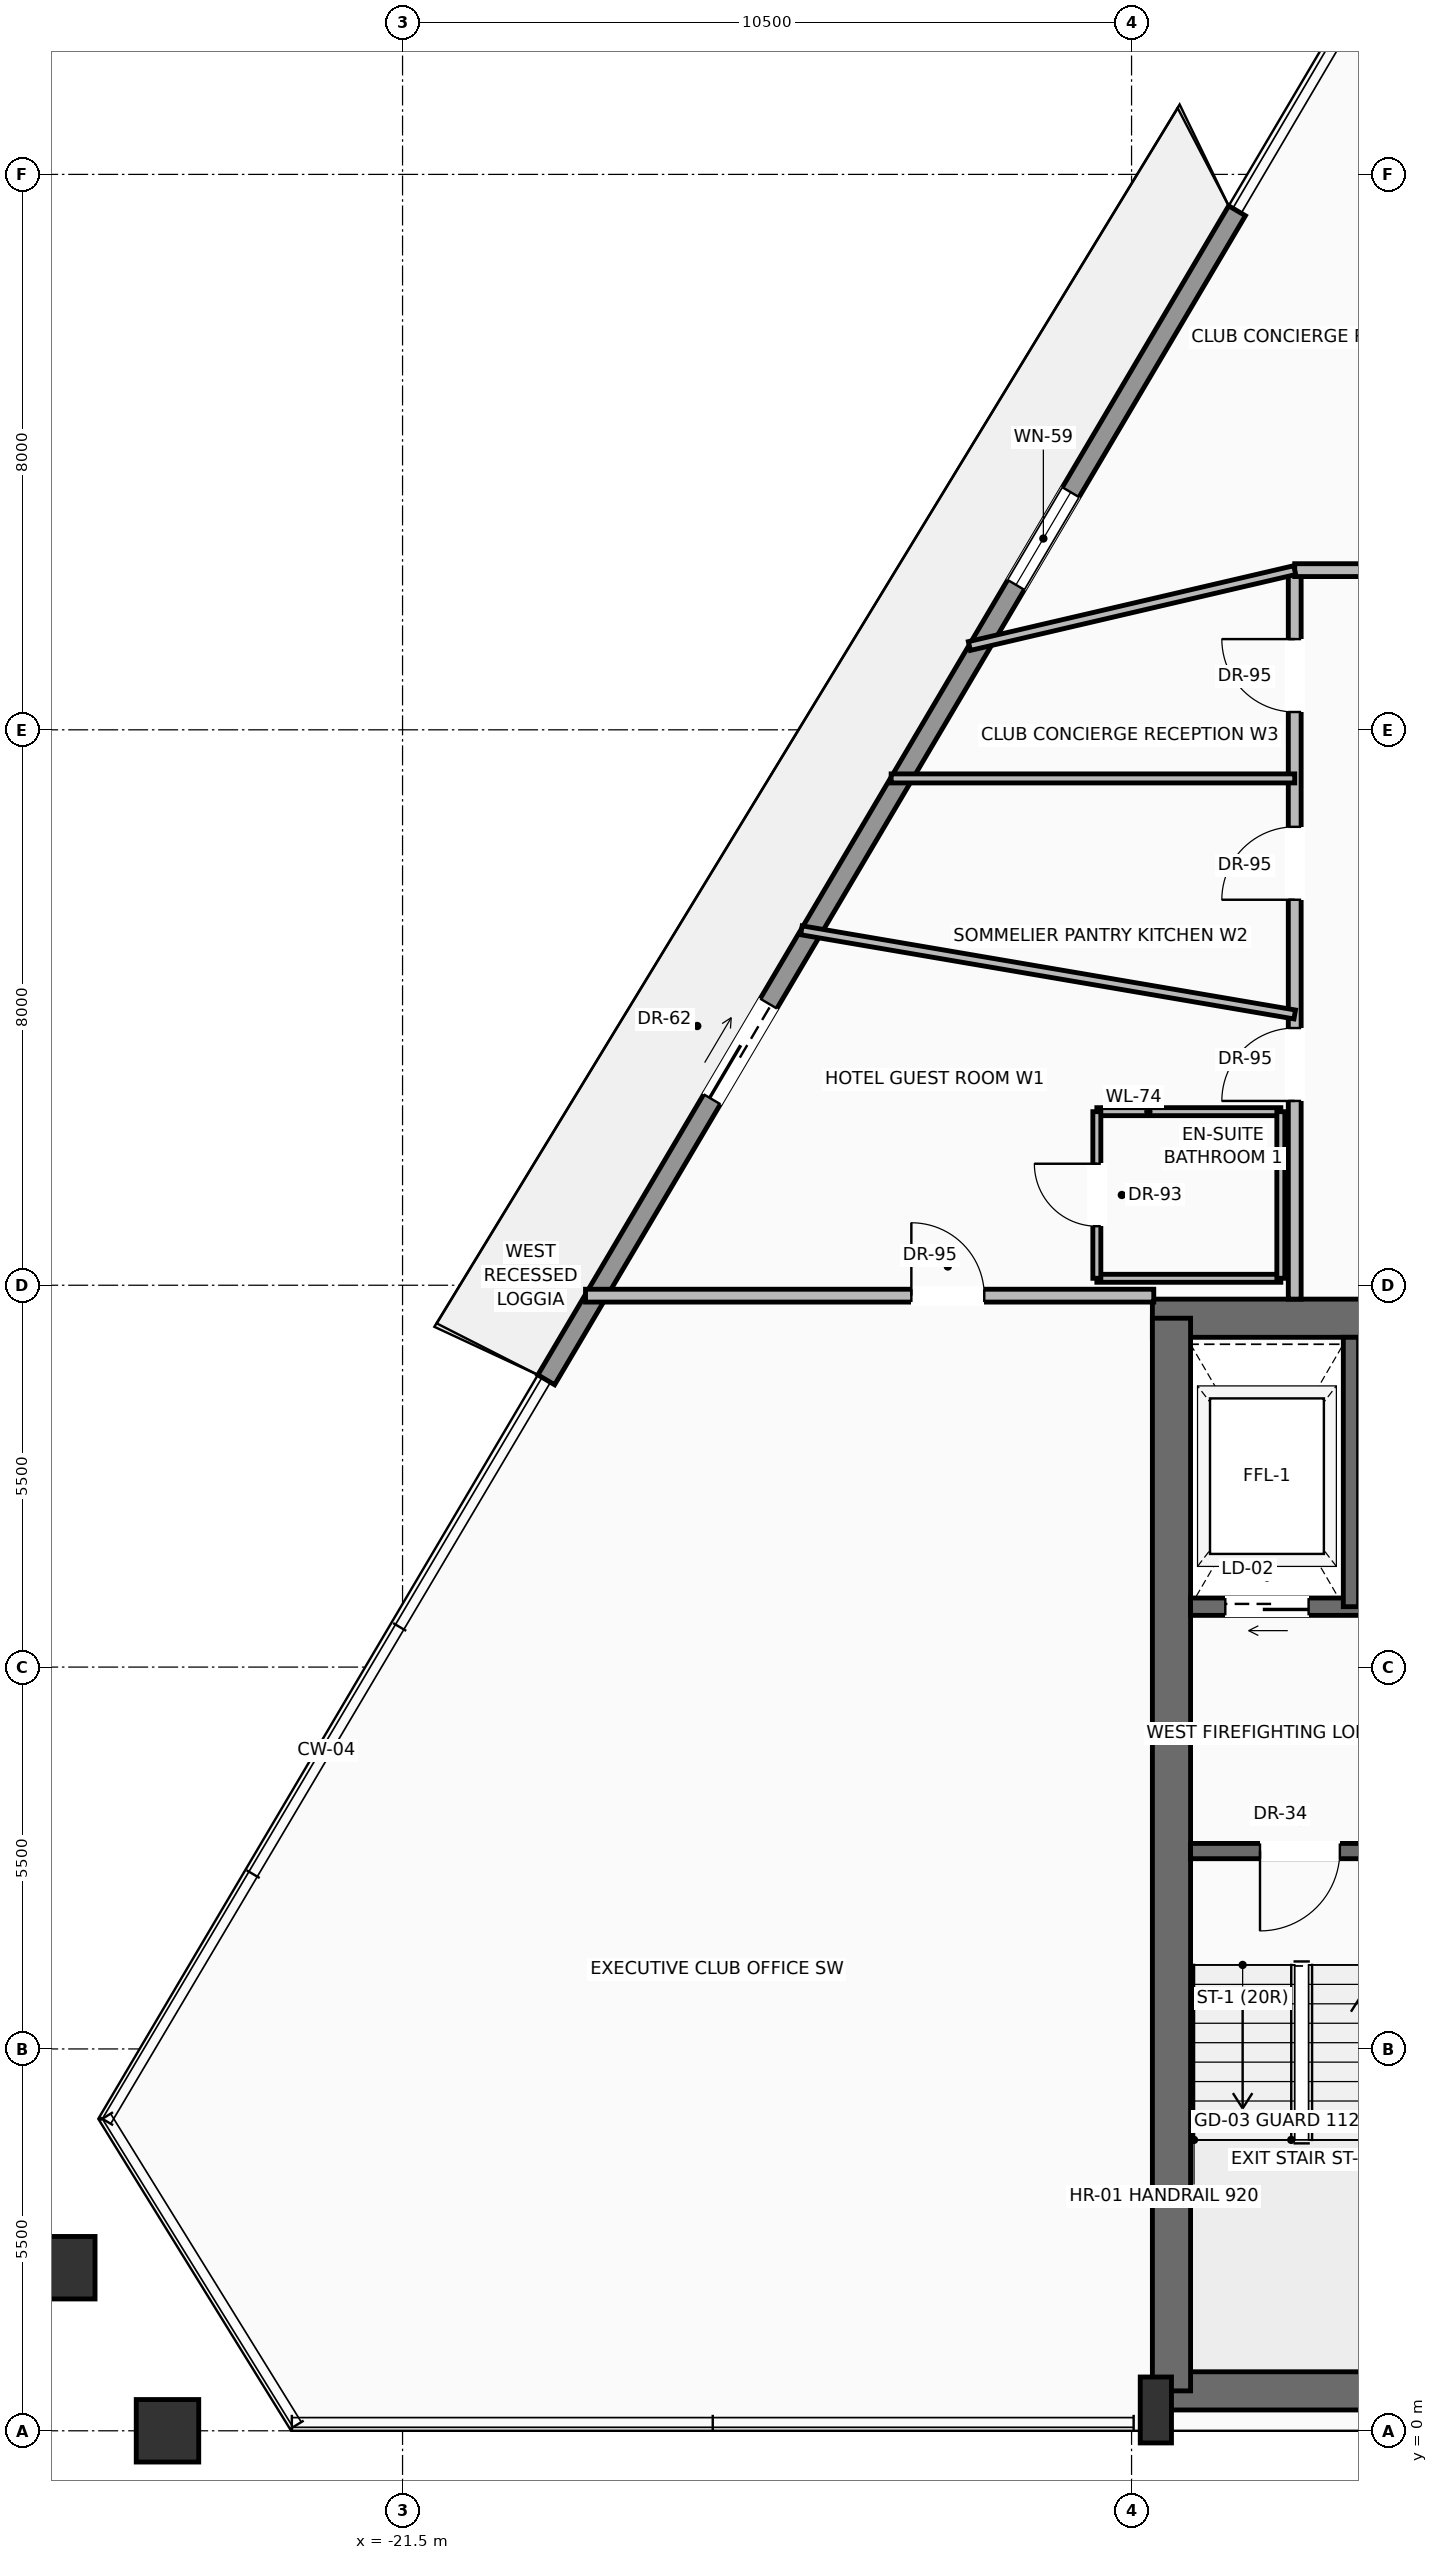
"""IFC4 building model, lengths in metres.
Left out: names, types, materials, properties, quantities, classifications, styles, units other than length and angle.
Written with IfcOpenShell. Run it as: python <this file> out.ifc"""

import sys

from ifc_helpers import new_model, si_unit, direction, frame, frame_2d, origin, origin_2d, place, context, subcontext, project, spatial, rectangle, hollow_rectangle, extrude, source, transform, mapped, element, fill, save


model = new_model("IFC4")
c1 = context("Model", 3, precision=1e-05, world=origin(), true_north=direction((0.0, 1.0)))
c2 = subcontext(c1, "Body", "Model", "MODEL_VIEW")
j1 = project(units=[si_unit("LENGTHUNIT", "METRE"), si_unit("PLANEANGLEUNIT", "RADIAN")], contexts=[c1])
p1 = place(None, origin())
s1 = spatial("IfcSite", under=j1, at=p1, CompositionType="ELEMENT")
p2 = place(p1, origin())
s2 = spatial("IfcBuilding", under=s1, at=p2, CompositionType="ELEMENT")
p3 = place(p2, frame((0.0, 0.0, 237.25)))
s3 = spatial("IfcBuildingStorey", under=s2, at=p3, CompositionType="ELEMENT", Elevation=237.25)
p4 = place(p3, frame((-10.65, 0.575, 0.0), z_axis=(0.0, 0.0, 1.0), x_axis=(1.0, 0.0, 0.0)))
e1 = element("IfcWall", 1, at=p4, inside=s3, PredefinedType="SHEAR", context=c2, shape_type="SweptSolid", body=[
    extrude(rectangle(XDim=21.3, YDim=0.55, at=frame_2d((10.65, 0.0))), origin(), (0.0, 0.0, 1.0), 3.24),
])
p5 = place(p3, frame((-10.7, 16.025, 0.0), z_axis=(0.0, 0.0, 1.0), x_axis=(1.0, 0.0, 0.0)))
e2 = element("IfcWall", 2, at=p5, inside=s3, PredefinedType="SHEAR", context=c2, shape_type="SweptSolid", body=[
    extrude(rectangle(XDim=21.4, YDim=0.55, at=frame_2d((10.7, 0.0))), origin(), (0.0, 0.0, 1.0), 3.24),
])
p6 = place(p5, frame((3.27, 0.0, 0.0)))
e3 = element("IfcOpeningElement", 3, at=p6, cuts=e2, PredefinedType="OPENING", context=c2, shape_type="SweptSolid", body=[
    extrude(rectangle(XDim=1.3, YDim=2.3, at=frame_2d((0.65, 1.15))), frame((0.0, 0.285, 0.0), z_axis=(0.0, -1.0, 0.0), x_axis=(1.0, 0.0, 0.0)), (0.0, 0.0, 1.0), 0.57),
])
p7 = place(p5, frame((9.7, 0.0, 0.0)))
e4 = element("IfcOpeningElement", 4, at=p7, cuts=e2, PredefinedType="OPENING", context=c2, shape_type="SweptSolid", body=[
    extrude(rectangle(XDim=2.0, YDim=2.4, at=frame_2d((1.0, 1.2))), frame((0.0, 0.285, 0.0), z_axis=(0.0, -1.0, 0.0), x_axis=(1.0, 0.0, 0.0)), (0.0, 0.0, 1.0), 0.57),
])
p8 = place(p3, frame((-10.425, 0.575, 0.0), z_axis=(0.0, 0.0, 1.0), x_axis=(0.0, 1.0, 0.0)))
e5 = element("IfcWall", 5, at=p8, inside=s3, PredefinedType="SHEAR", context=c2, shape_type="SweptSolid", body=[
    extrude(rectangle(XDim=15.45, YDim=0.55, at=frame_2d((7.725, 0.0))), origin(), (0.0, 0.0, 1.0), 3.24),
])
m1 = source(origin(), c2, "Body", "SweptSolid", [
    extrude(rectangle(XDim=0.45, YDim=0.95, at=origin_2d()), origin(), (0.0, 0.0, 1.0), 3.45),
])
p9 = place(p3, frame((-10.65, 0.3, 0.0), z_axis=(0.0, 0.0, 1.0), x_axis=(1.0, 0.0, 0.0)))
e6 = element("IfcColumn", 6, at=p9, inside=s3, PredefinedType="PILASTER", context=c2, shape_type="MappedRepresentation", body=[
    mapped(m1, transform((0.0, 0.0, 0.0), scale=1.0)),
])
m2 = source(origin(), c2, "Body", "SweptSolid", [
    extrude(hollow_rectangle(XDim=0.9, YDim=0.9, WallThickness=0.045, at=origin_2d()), origin(), (0.0, 0.0, 1.0), 3.441),
])
p10 = place(p3, frame((-24.885, 0.0, 0.004), z_axis=(-0.003192605226, 0.0, 0.999994903623), x_axis=(0.0, -1.0, 0.0)))
e7 = element("IfcColumn", 7, at=p10, inside=s3, PredefinedType="COLUMN", context=c2, shape_type="MappedRepresentation", body=[
    mapped(m2, transform((0.0, 0.0, 0.0), scale=1.0)),
])
m3 = source(origin(), c2, "Body", "SweptSolid", [
    extrude(hollow_rectangle(XDim=0.9, YDim=0.9, WallThickness=0.045, at=origin_2d()), origin(), (0.0, 0.0, 1.0), 3.442),
])
p11 = place(p3, frame((-26.379, 2.349, 0.004), z_axis=(0.00893764405, -0.017307818636, 0.999810260966), x_axis=(0.888524887604, 0.458828425566, 0.0)))
e8 = element("IfcColumn", 8, at=p11, inside=s3, PredefinedType="COLUMN", context=c2, shape_type="MappedRepresentation", body=[
    mapped(m3, transform((0.0, 0.0, 0.0), scale=1.0)),
])
p12 = place(p3, frame((-19.43, 15.137, 0.0), z_axis=(0.0, 0.0, 1.0), x_axis=(0.508699873742, 0.860943922944, 0.0)))
e9 = element("IfcWall", 9, at=p12, inside=s3, PredefinedType="SOLIDWALL", context=c2, shape_type="SweptSolid", body=[
    extrude(rectangle(XDim=19.559, YDim=0.28, at=frame_2d((9.779, 0.0))), origin(), (0.0, 0.0, 1.0), 2.82),
])
p13 = place(p12, frame((4.694, 0.0, 0.0)))
e10 = element("IfcOpeningElement", 10, at=p13, cuts=e9, PredefinedType="OPENING", context=c2, shape_type="SweptSolid", body=[
    extrude(rectangle(XDim=1.6, YDim=2.35, at=frame_2d((0.8, 1.175))), frame((0.0, 0.15, 0.0), z_axis=(0.0, -1.0, 0.0), x_axis=(1.0, 0.0, 0.0)), (0.0, 0.0, 1.0), 0.3),
])
p14 = place(p12, frame((13.3, 0.0, 0.9)))
e11 = element("IfcOpeningElement", 11, at=p14, cuts=e9, PredefinedType="OPENING", context=c2, shape_type="SweptSolid", body=[
    extrude(rectangle(XDim=1.55, YDim=1.75, at=frame_2d((0.775, 0.875))), frame((0.0, 0.15, 0.0), z_axis=(0.0, -1.0, 0.0), x_axis=(1.0, 0.0, 0.0)), (0.0, 0.0, 1.0), 0.3),
])
p15 = place(p3, frame((-5.5, 8.35, 0.0), z_axis=(0.0, 0.0, 1.0), x_axis=(-1.0, 0.0, 0.0)))
e12 = element("IfcWall", 12, at=p15, inside=s3, PredefinedType="SOLIDWALL", context=c2, shape_type="SweptSolid", body=[
    extrude(rectangle(XDim=4.65, YDim=0.22, at=frame_2d((2.325, 0.0))), origin(), (0.0, 0.0, 1.0), 3.24),
])
p16 = place(p15, frame((2.5, 0.0, 0.0)))
e13 = element("IfcOpeningElement", 13, at=p16, cuts=e12, PredefinedType="OPENING", context=c2, shape_type="SweptSolid", body=[
    extrude(rectangle(XDim=1.15, YDim=2.2, at=frame_2d((0.575, 1.1))), frame((0.0, 0.12, 0.0), z_axis=(0.0, -1.0, 0.0), x_axis=(1.0, 0.0, 0.0)), (0.0, 0.0, 1.0), 0.24),
])
p17 = place(p3, frame((-5.5, 11.87, 0.0), z_axis=(0.0, 0.0, 1.0), x_axis=(-1.0, 0.0, 0.0)))
e14 = element("IfcWall", 14, at=p17, inside=s3, PredefinedType="SOLIDWALL", context=c2, shape_type="SweptSolid", body=[
    extrude(rectangle(XDim=4.65, YDim=0.25, at=frame_2d((2.325, 0.0))), origin(), (0.0, 0.0, 1.0), 3.24),
])
p18 = place(p17, frame((2.95, 0.0, 0.0)))
e15 = element("IfcOpeningElement", 15, at=p18, cuts=e14, PredefinedType="OPENING", context=c2, shape_type="SweptSolid", body=[
    extrude(rectangle(XDim=1.2, YDim=2.25, at=frame_2d((0.6, 1.125))), frame((0.0, 0.135, 0.0), z_axis=(0.0, -1.0, 0.0), x_axis=(1.0, 0.0, 0.0)), (0.0, 0.0, 1.0), 0.27),
])
p19 = place(p3, frame((-7.84, 11.87, 0.0), z_axis=(0.0, 0.0, 1.0), x_axis=(0.0, 1.0, 0.0)))
e16 = element("IfcWall", 16, at=p19, inside=s3, PredefinedType="SOLIDWALL", context=c2, shape_type="SweptSolid", body=[
    extrude(rectangle(XDim=3.88, YDim=0.22, at=frame_2d((1.94, 0.0))), origin(), (0.0, 0.0, 1.0), 3.24),
])
p20 = place(p3, frame((-8.65, 16.3, 0.0), z_axis=(0.0, 0.0, 1.0), x_axis=(0.0, 1.0, 0.0)))
e17 = element("IfcWall", 17, at=p20, inside=s3, PredefinedType="PARTITIONING", context=c2, shape_type="SweptSolid", body=[
    extrude(rectangle(XDim=10.5, YDim=0.185, at=frame_2d((5.25, 0.0))), origin(), (0.0, 0.0, 1.0), 3.232),
])
p21 = place(p20, frame((2.854, 0.0, 0.0)))
e18 = element("IfcOpeningElement", 18, at=p21, cuts=e17, PredefinedType="OPENING", context=c2, shape_type="SweptSolid", body=[
    extrude(rectangle(XDim=1.05, YDim=2.25, at=frame_2d((0.525, 1.125))), frame((0.0, 0.103, 0.0), z_axis=(0.0, -1.0, 0.0), x_axis=(1.0, 0.0, 0.0)), (0.0, 0.0, 1.0), 0.205),
])
p22 = place(p20, frame((5.752, 0.0, 0.0)))
e19 = element("IfcOpeningElement", 19, at=p22, cuts=e17, PredefinedType="OPENING", context=c2, shape_type="SweptSolid", body=[
    extrude(rectangle(XDim=1.05, YDim=2.25, at=frame_2d((0.525, 1.125))), frame((0.0, 0.103, 0.0), z_axis=(0.0, -1.0, 0.0), x_axis=(1.0, 0.0, 0.0)), (0.0, 0.0, 1.0), 0.205),
])
p23 = place(p20, frame((8.457, 0.0, 0.0)))
e20 = element("IfcOpeningElement", 20, at=p23, cuts=e17, PredefinedType="OPENING", context=c2, shape_type="SweptSolid", body=[
    extrude(rectangle(XDim=1.05, YDim=2.25, at=frame_2d((0.525, 1.125))), frame((0.0, 0.103, 0.0), z_axis=(0.0, -1.0, 0.0), x_axis=(1.0, 0.0, 0.0)), (0.0, 0.0, 1.0), 0.205),
])
p24 = place(p3, frame((-8.65, 26.8, 0.0), z_axis=(0.0, 0.0, 1.0), x_axis=(1.0, 0.0, 0.0)))
e21 = element("IfcWall", 21, at=p24, inside=s3, PredefinedType="PARTITIONING", context=c2, shape_type="SweptSolid", body=[
    extrude(rectangle(XDim=16.6, YDim=0.185, at=frame_2d((8.3, 0.0))), origin(), (0.0, 0.0, 1.0), 3.232),
])
p25 = place(p24, frame((3.847, 0.0, 0.0)))
e22 = element("IfcOpeningElement", 22, at=p25, cuts=e21, PredefinedType="OPENING", context=c2, shape_type="SweptSolid", body=[
    extrude(rectangle(XDim=1.05, YDim=2.25, at=frame_2d((0.525, 1.125))), frame((0.0, 0.103, 0.0), z_axis=(0.0, -1.0, 0.0), x_axis=(1.0, 0.0, 0.0)), (0.0, 0.0, 1.0), 0.205),
])
p26 = place(p24, frame((6.903, 0.0, 0.0)))
e23 = element("IfcOpeningElement", 23, at=p26, cuts=e21, PredefinedType="OPENING", context=c2, shape_type="SweptSolid", body=[
    extrude(rectangle(XDim=1.05, YDim=2.25, at=frame_2d((0.525, 1.125))), frame((0.0, 0.103, 0.0), z_axis=(0.0, -1.0, 0.0), x_axis=(1.0, 0.0, 0.0)), (0.0, 0.0, 1.0), 0.205),
])
p27 = place(p24, frame((12.403, 0.0, 0.0)))
e24 = element("IfcOpeningElement", 24, at=p27, cuts=e21, PredefinedType="OPENING", context=c2, shape_type="SweptSolid", body=[
    extrude(rectangle(XDim=1.05, YDim=2.25, at=frame_2d((0.525, 1.125))), frame((0.0, 0.103, 0.0), z_axis=(0.0, -1.0, 0.0), x_axis=(1.0, 0.0, 0.0)), (0.0, 0.0, 1.0), 0.205),
])
p28 = place(p24, frame((1.403, 0.0, 0.0)))
e25 = element("IfcOpeningElement", 25, at=p28, cuts=e21, PredefinedType="OPENING", context=c2, shape_type="SweptSolid", body=[
    extrude(rectangle(XDim=1.05, YDim=2.25, at=frame_2d((0.525, 1.125))), frame((0.0, 0.103, 0.0), z_axis=(0.0, -1.0, 0.0), x_axis=(1.0, 0.0, 0.0)), (0.0, 0.0, 1.0), 0.205),
])
p29 = place(p3, frame((-18.865, 16.35, 0.0), z_axis=(0.0, 0.0, 1.0), x_axis=(1.0, 0.0, 0.0)))
e26 = element("IfcWall", 26, at=p29, inside=s3, PredefinedType="PARTITIONING", context=c2, shape_type="SweptSolid", body=[
    extrude(rectangle(XDim=8.185, YDim=0.185, at=frame_2d((4.092, 0.0))), origin(), (0.0, 0.0, 1.0), 3.232),
])
p30 = place(p29, frame((4.693, 0.0, 0.0)))
e27 = element("IfcOpeningElement", 27, at=p30, cuts=e26, PredefinedType="OPENING", context=c2, shape_type="SweptSolid", body=[
    extrude(rectangle(XDim=1.05, YDim=2.25, at=frame_2d((0.525, 1.125))), frame((0.0, 0.103, 0.0), z_axis=(0.0, -1.0, 0.0), x_axis=(1.0, 0.0, 0.0)), (0.0, 0.0, 1.0), 0.205),
])
p31 = place(p3, frame((-13.336, 25.707, 0.0), z_axis=(0.0, 0.0, 1.0), x_axis=(0.973859170727, 0.227152626203, 0.0)))
e28 = element("IfcWall", 28, at=p31, inside=s3, PredefinedType="PARTITIONING", context=c2, shape_type="SweptSolid", body=[
    extrude(rectangle(XDim=4.812, YDim=0.13, at=frame_2d((2.406, 0.0))), origin(), (0.0, 0.0, 1.0), 3.232),
])
for number, where, z_axis, x_axis in (
    (29, (-11.5, 16.6, 0.0), (0.0, 0.0, 1.0), (1.0, 0.0, 0.0)),
    (30, (-11.5, 19.0, 0.0), (0.0, 0.0, 1.0), (1.0, 0.0, 0.0)),
):
    element("IfcWall", number, at=place(p3, frame(where, z_axis=z_axis, x_axis=x_axis)), inside=s3, PredefinedType="PARTITIONING", context=c2, shape_type="SweptSolid", body=[
        extrude(rectangle(XDim=2.65, YDim=0.115, at=frame_2d((1.325, 0.0))), origin(), (0.0, 0.0, 1.0), 3.232),
    ])
p32 = place(p3, frame((-11.5, 16.6, 0.0), z_axis=(0.0, 0.0, 1.0), x_axis=(0.0, 1.0, 0.0)))
e31 = element("IfcWall", 31, at=p32, inside=s3, PredefinedType="PARTITIONING", context=c2, shape_type="SweptSolid", body=[
    extrude(rectangle(XDim=2.4, YDim=0.115, at=frame_2d((1.2, 0.0))), origin(), (0.0, 0.0, 1.0), 3.232),
])
p33 = place(p32, frame((0.75, 0.0, 0.0)))
e32 = element("IfcOpeningElement", 32, at=p33, cuts=e31, PredefinedType="OPENING", context=c2, shape_type="SweptSolid", body=[
    extrude(rectangle(XDim=0.9, YDim=2.15, at=frame_2d((0.45, 1.075))), frame((0.0, 0.067, 0.0), z_axis=(0.0, -1.0, 0.0), x_axis=(1.0, 0.0, 0.0)), (0.0, 0.0, 1.0), 0.135),
])
p34 = place(p3, frame((-8.85, 16.6, 0.0), z_axis=(0.0, 0.0, 1.0), x_axis=(0.0, 1.0, 0.0)))
e33 = element("IfcWall", 33, at=p34, inside=s3, PredefinedType="PARTITIONING", context=c2, shape_type="SweptSolid", body=[
    extrude(rectangle(XDim=2.4, YDim=0.115, at=frame_2d((1.2, 0.0))), origin(), (0.0, 0.0, 1.0), 3.232),
])
p35 = place(p3, frame((-15.755, 21.613, 0.0), z_axis=(0.0, 0.0, 1.0), x_axis=(0.985747524056, -0.1682314442, 0.0)))
e34 = element("IfcWall", 34, at=p35, inside=s3, PredefinedType="PARTITIONING", context=c2, shape_type="SweptSolid", body=[
    extrude(rectangle(XDim=7.208, YDim=0.13, at=frame_2d((3.604, 0.0))), origin(), (0.0, 0.0, 1.0), 3.232),
])
p36 = place(p3, frame((-14.463, 23.8, 0.0), z_axis=(0.0, 0.0, 1.0), x_axis=(1.0, 0.0, 0.0)))
e35 = element("IfcWall", 35, at=p36, inside=s3, PredefinedType="PARTITIONING", context=c2, shape_type="SweptSolid", body=[
    extrude(rectangle(XDim=5.813, YDim=0.13, at=frame_2d((2.906, 0.0))), origin(), (0.0, 0.0, 1.0), 3.232),
])
m4 = source(origin(), c2, "Body", "SweptSolid", [
    extrude(rectangle(XDim=1.6, YDim=2.35, at=frame_2d((0.8, 1.175))), frame((0.0, 0.025, 0.0), z_axis=(0.0, -1.0, 0.0), x_axis=(1.0, 0.0, 0.0)), (0.0, 0.0, 1.0), 0.05),
])
p37 = place(p13, origin())
e36 = element("IfcDoor", 36, at=p37, inside=s3, OperationType="SLIDING_TO_LEFT", PredefinedType="DOOR", context=c2, shape_type="MappedRepresentation", body=[
    mapped(m4, transform((0.0, 0.0, 0.0), scale=1.0)),
])
fill(e10, e36)
m5 = source(origin(), c2, "Body", "SweptSolid", [
    extrude(rectangle(XDim=1.55, YDim=1.75, at=frame_2d((0.775, 0.875))), frame((0.0, 0.03, 0.0), z_axis=(0.0, -1.0, 0.0), x_axis=(1.0, 0.0, 0.0)), (0.0, 0.0, 1.0), 0.06),
])
p38 = place(p14, origin())
e37 = element("IfcWindow", 37, at=p38, inside=s3, PartitioningType="SINGLE_PANEL", PredefinedType="WINDOW", context=c2, shape_type="MappedRepresentation", body=[
    mapped(m5, transform((0.0, 0.0, 0.0), scale=1.0)),
])
fill(e11, e37)
m6 = source(origin(), c2, "Body", "SweptSolid", [
    extrude(rectangle(XDim=1.15, YDim=2.2, at=frame_2d((0.575, 1.1))), frame((0.0, 0.025, 0.0), z_axis=(0.0, -1.0, 0.0), x_axis=(1.0, 0.0, 0.0)), (0.0, 0.0, 1.0), 0.05),
])
p39 = place(p16, origin())
e38 = element("IfcDoor", 38, at=p39, inside=s3, OperationType="SINGLE_SWING_RIGHT", PredefinedType="DOOR", context=c2, shape_type="MappedRepresentation", body=[
    mapped(m6, transform((0.0, 0.0, 0.0), scale=1.0)),
])
fill(e13, e38)
m7 = source(origin(), c2, "Body", "SweptSolid", [
    extrude(rectangle(XDim=1.2, YDim=2.25, at=frame_2d((0.6, 1.125))), frame((0.0, 0.025, 0.0), z_axis=(0.0, -1.0, 0.0), x_axis=(1.0, 0.0, 0.0)), (0.0, 0.0, 1.0), 0.05),
])
p40 = place(p18, origin())
e39 = element("IfcDoor", 39, at=p40, inside=s3, OperationType="SLIDING_TO_LEFT", PredefinedType="DOOR", context=c2, shape_type="MappedRepresentation", body=[
    mapped(m7, transform((0.0, 0.0, 0.0), scale=1.0)),
])
fill(e15, e39)
m8 = source(origin(), c2, "Body", "SweptSolid", [
    extrude(rectangle(XDim=1.05, YDim=2.25, at=frame_2d((0.525, 1.125))), frame((0.0, 0.025, 0.0), z_axis=(0.0, -1.0, 0.0), x_axis=(1.0, 0.0, 0.0)), (0.0, 0.0, 1.0), 0.05),
])
p41 = place(p30, origin())
e40 = element("IfcDoor", 40, at=p41, inside=s3, OperationType="SINGLE_SWING_LEFT", PredefinedType="DOOR", context=c2, shape_type="MappedRepresentation", body=[
    mapped(m8, transform((0.0, 0.0, 0.0), scale=1.0)),
])
fill(e27, e40)
p42 = place(p21, origin())
e41 = element("IfcDoor", 41, at=p42, inside=s3, OperationType="SINGLE_SWING_LEFT", PredefinedType="DOOR", context=c2, shape_type="MappedRepresentation", body=[
    mapped(m8, transform((0.0, 0.0, 0.0), scale=1.0)),
])
fill(e18, e41)
m9 = source(origin(), c2, "Body", "SweptSolid", [
    extrude(rectangle(XDim=0.9, YDim=2.15, at=frame_2d((0.45, 1.075))), frame((0.0, 0.025, 0.0), z_axis=(0.0, -1.0, 0.0), x_axis=(1.0, 0.0, 0.0)), (0.0, 0.0, 1.0), 0.05),
])
p43 = place(p33, origin())
e42 = element("IfcDoor", 42, at=p43, inside=s3, OperationType="SINGLE_SWING_RIGHT", PredefinedType="DOOR", context=c2, shape_type="MappedRepresentation", body=[
    mapped(m9, transform((0.0, 0.0, 0.0), scale=1.0)),
])
fill(e32, e42)
p44 = place(p22, origin())
e43 = element("IfcDoor", 43, at=p44, inside=s3, OperationType="SINGLE_SWING_LEFT", PredefinedType="DOOR", context=c2, shape_type="MappedRepresentation", body=[
    mapped(m8, transform((0.0, 0.0, 0.0), scale=1.0)),
])
fill(e19, e43)
p45 = place(p23, origin())
e44 = element("IfcDoor", 44, at=p45, inside=s3, OperationType="SINGLE_SWING_RIGHT", PredefinedType="DOOR", context=c2, shape_type="MappedRepresentation", body=[
    mapped(m8, transform((0.0, 0.0, 0.0), scale=1.0)),
])
fill(e20, e44)
save(model, sys.argv[1])
